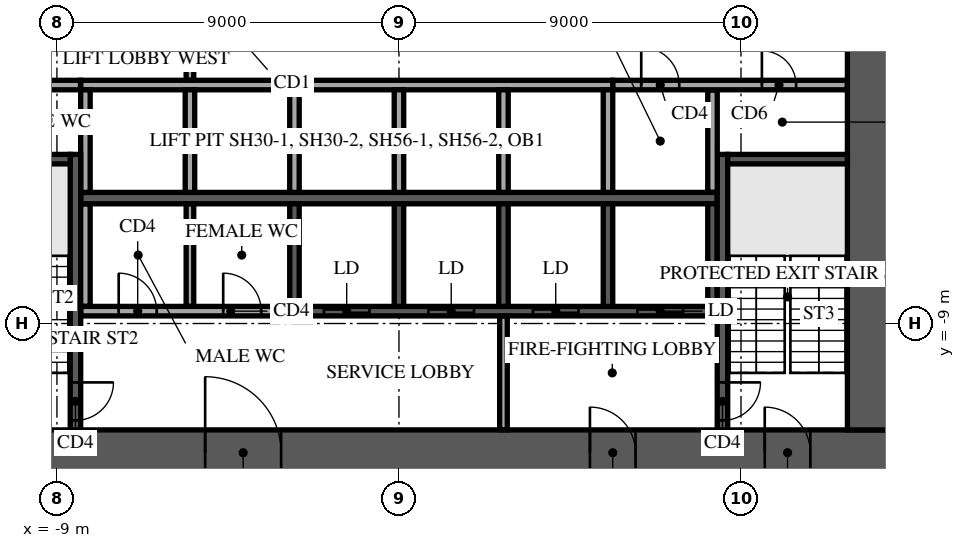
"""IFC4 building model, lengths in metres.
Left out: names, types, materials, properties, quantities, classifications, styles, units other than length and angle.
Written with IfcOpenShell. Run it as: python <this file> out.ifc"""

import sys

from ifc_helpers import new_model, si_unit, direction, frame, frame_2d, origin, place, context, subcontext, project, spatial, rectangle, extrude, element, fill, save


model = new_model("IFC4")
c1 = context("Model", 3, precision=1e-05, world=origin(), true_north=direction((0.0, 1.0)))
c2 = subcontext(c1, "Body", "Model", "MODEL_VIEW")
j1 = project(units=[si_unit("LENGTHUNIT", "METRE"), si_unit("PLANEANGLEUNIT", "RADIAN")], contexts=[c1])
p1 = place(None, origin())
s1 = spatial("IfcSite", under=j1, at=p1, CompositionType="ELEMENT")
p2 = place(p1, origin())
s2 = spatial("IfcBuilding", under=s1, at=p2, CompositionType="ELEMENT")
p3 = place(p2, frame((0.0, 0.0, -4.5)))
s3 = spatial("IfcBuildingStorey", under=s2, at=p3, CompositionType="ELEMENT", Elevation=-4.5)
p4 = place(p3, frame((-13.0, -12.4, 0.0), z_axis=(0.0, 0.0, 1.0), x_axis=(1.0, 0.0, 0.0)))
e1 = element("IfcWall", 1, at=p4, inside=s3, PredefinedType="SHEAR", context=c2, shape_type="SweptSolid", body=[
    extrude(rectangle(XDim=26.0, YDim=1.2, at=frame_2d((13.0, 0.0))), origin(), (0.0, 0.0, 1.0), 4.1),
])
p5 = place(p4, frame((7.9, 0.0, 0.0)))
e2 = element("IfcOpeningElement", 2, at=p5, cuts=e1, PredefinedType="OPENING", context=c2, shape_type="SweptSolid", body=[
    extrude(rectangle(XDim=2.0, YDim=2.1, at=frame_2d((1.0, 1.05))), frame((0.0, 0.61, 0.0), z_axis=(0.0, -1.0, 0.0), x_axis=(1.0, 0.0, 0.0)), (0.0, 0.0, 1.0), 1.22),
])
p6 = place(p4, frame((18.025, 0.0, 0.0)))
e3 = element("IfcOpeningElement", 3, at=p6, cuts=e1, PredefinedType="OPENING", context=c2, shape_type="SweptSolid", body=[
    extrude(rectangle(XDim=1.2, YDim=2.1, at=frame_2d((0.6, 1.05))), frame((0.0, 0.61, 0.0), z_axis=(0.0, -1.0, 0.0), x_axis=(1.0, 0.0, 0.0)), (0.0, 0.0, 1.0), 1.22),
])
p7 = place(p4, frame((2.175, 0.0, 0.0)))
e4 = element("IfcOpeningElement", 4, at=p7, cuts=e1, PredefinedType="OPENING", context=c2, shape_type="SweptSolid", body=[
    extrude(rectangle(XDim=1.2, YDim=2.1, at=frame_2d((0.6, 1.05))), frame((0.0, 0.61, 0.0), z_axis=(0.0, -1.0, 0.0), x_axis=(1.0, 0.0, 0.0)), (0.0, 0.0, 1.0), 1.22),
])
p8 = place(p4, frame((22.625, 0.0, 0.0)))
e5 = element("IfcOpeningElement", 5, at=p8, cuts=e1, PredefinedType="OPENING", context=c2, shape_type="SweptSolid", body=[
    extrude(rectangle(XDim=1.2, YDim=2.1, at=frame_2d((0.6, 1.05))), frame((0.0, 0.61, 0.0), z_axis=(0.0, -1.0, 0.0), x_axis=(1.0, 0.0, 0.0)), (0.0, 0.0, 1.0), 1.22),
])
p9 = place(p3, frame((12.4, -11.8, 0.0), z_axis=(0.0, 0.0, 1.0), x_axis=(0.0, 1.0, 0.0)))
e6 = element("IfcWall", 6, at=p9, inside=s3, PredefinedType="SHEAR", context=c2, shape_type="SweptSolid", body=[
    extrude(rectangle(XDim=23.6, YDim=1.2, at=frame_2d((11.8, 0.0))), origin(), (0.0, 0.0, 1.0), 4.1),
])
p10 = place(p9, frame((10.6, 0.0, 0.0)))
e7 = element("IfcOpeningElement", 7, at=p10, cuts=e6, PredefinedType="OPENING", context=c2, shape_type="SweptSolid", body=[
    extrude(rectangle(XDim=2.4, YDim=2.4, at=frame_2d((1.2, 1.2))), frame((0.0, 0.61, 0.0), z_axis=(0.0, -1.0, 0.0), x_axis=(1.0, 0.0, 0.0)), (0.0, 0.0, 1.0), 1.22),
])
p11 = place(p3, frame((-8.375, -5.7, 0.0), z_axis=(0.0, 0.0, 1.0), x_axis=(1.0, 0.0, 0.0)))
e8 = element("IfcWall", 8, at=p11, inside=s3, PredefinedType="SOLIDWALL", context=c2, shape_type="SweptSolid", body=[
    extrude(rectangle(XDim=16.75, YDim=0.3, at=frame_2d((8.375, 0.0))), origin(), (0.0, 0.0, 1.0), 4.1),
])
p12 = place(p3, frame((-8.375, -2.725, 0.0), z_axis=(0.0, 0.0, 1.0), x_axis=(1.0, 0.0, 0.0)))
e9 = element("IfcWall", 9, at=p12, inside=s3, PredefinedType="SOLIDWALL", context=c2, shape_type="SweptSolid", body=[
    extrude(rectangle(XDim=14.0, YDim=0.25, at=frame_2d((7.0, 0.0))), origin(), (0.0, 0.0, 1.0), 4.1),
])
for number, where, z_axis, x_axis in (
    (10, (-8.25, -5.55, 0.0), (0.0, 0.0, 1.0), (0.0, 1.0, 0.0)),
    (11, (-5.5, -5.55, 0.0), (0.0, 0.0, 1.0), (0.0, 1.0, 0.0)),
    (12, (-2.75, -5.55, 0.0), (0.0, 0.0, 1.0), (0.0, 1.0, 0.0)),
    (13, (0.0, -5.55, 0.0), (0.0, 0.0, 1.0), (0.0, 1.0, 0.0)),
    (14, (2.75, -5.55, 0.0), (0.0, 0.0, 1.0), (0.0, 1.0, 0.0)),
    (15, (5.5, -5.55, 0.0), (0.0, 0.0, 1.0), (0.0, 1.0, 0.0)),
):
    element("IfcWall", number, at=place(p3, frame(where, z_axis=z_axis, x_axis=x_axis)), inside=s3, PredefinedType="SOLIDWALL", context=c2, shape_type="SweptSolid", body=[
        extrude(rectangle(XDim=2.7, YDim=0.25, at=frame_2d((1.35, 0.0))), origin(), (0.0, 0.0, 1.0), 4.1),
    ])
p13 = place(p3, frame((-2.875, -8.675, 0.0), z_axis=(0.0, 0.0, 1.0), x_axis=(1.0, 0.0, 0.0)))
e16 = element("IfcWall", 16, at=p13, inside=s3, PredefinedType="SOLIDWALL", context=c2, shape_type="SweptSolid", body=[
    extrude(rectangle(XDim=11.25, YDim=0.25, at=frame_2d((5.625, 0.0))), origin(), (0.0, 0.0, 1.0), 4.1),
])
p14 = place(p13, frame((0.9, 0.0, 0.0)))
e17 = element("IfcOpeningElement", 17, at=p14, cuts=e16, PredefinedType="OPENING", context=c2, shape_type="SweptSolid", body=[
    extrude(rectangle(XDim=1.2, YDim=2.1, at=frame_2d((0.6, 1.05))), frame((0.0, 0.135, 0.0), z_axis=(0.0, -1.0, 0.0), x_axis=(1.0, 0.0, 0.0)), (0.0, 0.0, 1.0), 0.27),
])
p15 = place(p13, frame((3.65, 0.0, 0.0)))
e18 = element("IfcOpeningElement", 18, at=p15, cuts=e16, PredefinedType="OPENING", context=c2, shape_type="SweptSolid", body=[
    extrude(rectangle(XDim=1.2, YDim=2.1, at=frame_2d((0.6, 1.05))), frame((0.0, 0.135, 0.0), z_axis=(0.0, -1.0, 0.0), x_axis=(1.0, 0.0, 0.0)), (0.0, 0.0, 1.0), 0.27),
])
p16 = place(p13, frame((6.4, 0.0, 0.0)))
e19 = element("IfcOpeningElement", 19, at=p16, cuts=e16, PredefinedType="OPENING", context=c2, shape_type="SweptSolid", body=[
    extrude(rectangle(XDim=1.2, YDim=2.1, at=frame_2d((0.6, 1.05))), frame((0.0, 0.135, 0.0), z_axis=(0.0, -1.0, 0.0), x_axis=(1.0, 0.0, 0.0)), (0.0, 0.0, 1.0), 0.27),
])
p17 = place(p13, frame((9.15, 0.0, 0.0)))
e20 = element("IfcOpeningElement", 20, at=p17, cuts=e16, PredefinedType="OPENING", context=c2, shape_type="SweptSolid", body=[
    extrude(rectangle(XDim=1.2, YDim=2.1, at=frame_2d((0.6, 1.05))), frame((0.0, 0.135, 0.0), z_axis=(0.0, -1.0, 0.0), x_axis=(1.0, 0.0, 0.0)), (0.0, 0.0, 1.0), 0.27),
])
for number, where, z_axis, x_axis in (
    (21, (-2.75, -8.55, 0.0), (0.0, 0.0, 1.0), (0.0, 1.0, 0.0)),
    (22, (0.0, -8.55, 0.0), (0.0, 0.0, 1.0), (0.0, 1.0, 0.0)),
    (23, (2.75, -8.55, 0.0), (0.0, 0.0, 1.0), (0.0, 1.0, 0.0)),
    (24, (5.5, -8.55, 0.0), (0.0, 0.0, 1.0), (0.0, 1.0, 0.0)),
    (25, (8.25, -8.55, 0.0), (0.0, 0.0, 1.0), (0.0, 1.0, 0.0)),
):
    element("IfcWall", number, at=place(p3, frame(where, z_axis=z_axis, x_axis=x_axis)), inside=s3, PredefinedType="SOLIDWALL", context=c2, shape_type="SweptSolid", body=[
        extrude(rectangle(XDim=2.7, YDim=0.25, at=frame_2d((1.35, 0.0))), origin(), (0.0, 0.0, 1.0), 4.1),
    ])
p18 = place(p3, frame((-8.512, -4.55, 0.0), z_axis=(0.0, 0.0, 1.0), x_axis=(0.0, -1.0, 0.0)))
e26 = element("IfcWall", 26, at=p18, inside=s3, PredefinedType="SOLIDWALL", context=c2, shape_type="SweptSolid", body=[
    extrude(rectangle(XDim=7.25, YDim=0.275, at=frame_2d((3.625, 0.0))), origin(), (0.0, 0.0, 1.0), 4.1),
])
p19 = place(p18, frame((6.0, 0.0, 0.0)))
e27 = element("IfcOpeningElement", 27, at=p19, cuts=e26, PredefinedType="OPENING", context=c2, shape_type="SweptSolid", body=[
    extrude(rectangle(XDim=1.0, YDim=2.1, at=frame_2d((0.5, 1.05))), frame((0.0, 0.147, 0.0), z_axis=(0.0, -1.0, 0.0), x_axis=(1.0, 0.0, 0.0)), (0.0, 0.0, 1.0), 0.295),
])
p20 = place(p3, frame((-8.65, -4.675, 0.0), z_axis=(0.0, 0.0, 1.0), x_axis=(-1.0, 0.0, 0.0)))
e28 = element("IfcWall", 28, at=p20, inside=s3, PredefinedType="SOLIDWALL", context=c2, shape_type="SweptSolid", body=[
    extrude(rectangle(XDim=3.15, YDim=0.25, at=frame_2d((1.575, 0.0))), origin(), (0.0, 0.0, 1.0), 4.1),
])
p21 = place(p3, frame((8.512, -4.55, 0.0), z_axis=(0.0, 0.0, 1.0), x_axis=(0.0, -1.0, 0.0)))
e29 = element("IfcWall", 29, at=p21, inside=s3, PredefinedType="SOLIDWALL", context=c2, shape_type="SweptSolid", body=[
    extrude(rectangle(XDim=7.25, YDim=0.275, at=frame_2d((3.625, 0.0))), origin(), (0.0, 0.0, 1.0), 4.1),
])
p22 = place(p21, frame((6.0, 0.0, 0.0)))
e30 = element("IfcOpeningElement", 30, at=p22, cuts=e29, PredefinedType="OPENING", context=c2, shape_type="SweptSolid", body=[
    extrude(rectangle(XDim=1.0, YDim=2.1, at=frame_2d((0.5, 1.05))), frame((0.0, 0.147, 0.0), z_axis=(0.0, -1.0, 0.0), x_axis=(1.0, 0.0, 0.0)), (0.0, 0.0, 1.0), 0.295),
])
p23 = place(p3, frame((8.65, -4.675, 0.0), z_axis=(0.0, 0.0, 1.0), x_axis=(1.0, 0.0, 0.0)))
e31 = element("IfcWall", 31, at=p23, inside=s3, PredefinedType="SOLIDWALL", context=c2, shape_type="SweptSolid", body=[
    extrude(rectangle(XDim=3.15, YDim=0.25, at=frame_2d((1.575, 0.0))), origin(), (0.0, 0.0, 1.0), 4.1),
])
p24 = place(p3, frame((2.75, -11.795, 0.0), z_axis=(0.0, 0.0, 1.0), x_axis=(0.0, 1.0, 0.0)))
e32 = element("IfcWall", 32, at=p24, inside=s3, PredefinedType="PARTITIONING", context=c2, shape_type="SweptSolid", body=[
    extrude(rectangle(XDim=2.99, YDim=0.2, at=frame_2d((1.495, 0.0))), origin(), (0.0, 0.0, 1.0), 4.1),
])
p25 = place(p3, frame((-8.37, -8.675, 0.0), z_axis=(0.0, 0.0, 1.0), x_axis=(1.0, 0.0, 0.0)))
e33 = element("IfcWall", 33, at=p25, inside=s3, PredefinedType="PARTITIONING", context=c2, shape_type="SweptSolid", body=[
    extrude(rectangle(XDim=5.49, YDim=0.25, at=frame_2d((2.745, 0.0))), origin(), (0.0, 0.0, 1.0), 4.1),
])
p26 = place(p25, frame((0.995, 0.0, 0.0)))
e34 = element("IfcOpeningElement", 34, at=p26, cuts=e33, PredefinedType="OPENING", context=c2, shape_type="SweptSolid", body=[
    extrude(rectangle(XDim=1.0, YDim=2.1, at=frame_2d((0.5, 1.05))), frame((0.0, 0.135, 0.0), z_axis=(0.0, -1.0, 0.0), x_axis=(1.0, 0.0, 0.0)), (0.0, 0.0, 1.0), 0.27),
])
p27 = place(p25, frame((3.745, 0.0, 0.0)))
e35 = element("IfcOpeningElement", 35, at=p27, cuts=e33, PredefinedType="OPENING", context=c2, shape_type="SweptSolid", body=[
    extrude(rectangle(XDim=1.0, YDim=2.1, at=frame_2d((0.5, 1.05))), frame((0.0, 0.135, 0.0), z_axis=(0.0, -1.0, 0.0), x_axis=(1.0, 0.0, 0.0)), (0.0, 0.0, 1.0), 0.27),
])
p28 = place(p3, frame((-8.25, -8.545, 0.0), z_axis=(0.0, 0.0, 1.0), x_axis=(0.0, 1.0, 0.0)))
e36 = element("IfcWall", 36, at=p28, inside=s3, PredefinedType="PARTITIONING", context=c2, shape_type="SweptSolid", body=[
    extrude(rectangle(XDim=2.69, YDim=0.25, at=frame_2d((1.345, 0.0))), origin(), (0.0, 0.0, 1.0), 4.1),
])
p29 = place(p3, frame((-5.5, -8.545, 0.0), z_axis=(0.0, 0.0, 1.0), x_axis=(0.0, 1.0, 0.0)))
e37 = element("IfcWall", 37, at=p29, inside=s3, PredefinedType="PARTITIONING", context=c2, shape_type="SweptSolid", body=[
    extrude(rectangle(XDim=2.69, YDim=0.2, at=frame_2d((1.345, 0.0))), origin(), (0.0, 0.0, 1.0), 4.1),
])
p30 = place(p3, frame((8.25, -5.545, 0.0), z_axis=(0.0, 0.0, 1.0), x_axis=(0.0, 1.0, 0.0)))
e38 = element("IfcWall", 38, at=p30, inside=s3, PredefinedType="PARTITIONING", context=c2, shape_type="SweptSolid", body=[
    extrude(rectangle(XDim=2.69, YDim=0.25, at=frame_2d((1.345, 0.0))), origin(), (0.0, 0.0, 1.0), 4.1),
])
p31 = place(p3, frame((-11.795, -2.725, 0.0), z_axis=(0.0, 0.0, 1.0), x_axis=(1.0, 0.0, 0.0)))
e39 = element("IfcWall", 39, at=p31, inside=s3, PredefinedType="PARTITIONING", context=c2, shape_type="SweptSolid", body=[
    extrude(rectangle(XDim=3.415, YDim=0.25, at=frame_2d((1.708, 0.0))), origin(), (0.0, 0.0, 1.0), 4.1),
])
p32 = place(p31, frame((1.295, 0.0, 0.0)))
e40 = element("IfcOpeningElement", 40, at=p32, cuts=e39, PredefinedType="OPENING", context=c2, shape_type="SweptSolid", body=[
    extrude(rectangle(XDim=1.0, YDim=2.1, at=frame_2d((0.5, 1.05))), frame((0.0, 0.135, 0.0), z_axis=(0.0, -1.0, 0.0), x_axis=(1.0, 0.0, 0.0)), (0.0, 0.0, 1.0), 0.27),
])
p33 = place(p3, frame((5.63, -2.725, 0.0), z_axis=(0.0, 0.0, 1.0), x_axis=(1.0, 0.0, 0.0)))
e41 = element("IfcWall", 41, at=p33, inside=s3, PredefinedType="PARTITIONING", context=c2, shape_type="SweptSolid", body=[
    extrude(rectangle(XDim=6.165, YDim=0.25, at=frame_2d((3.083, 0.0))), origin(), (0.0, 0.0, 1.0), 4.1),
])
p34 = place(p33, frame((0.745, 0.0, 0.0)))
e42 = element("IfcOpeningElement", 42, at=p34, cuts=e41, PredefinedType="OPENING", context=c2, shape_type="SweptSolid", body=[
    extrude(rectangle(XDim=1.0, YDim=2.1, at=frame_2d((0.5, 1.05))), frame((0.0, 0.135, 0.0), z_axis=(0.0, -1.0, 0.0), x_axis=(1.0, 0.0, 0.0)), (0.0, 0.0, 1.0), 0.27),
])
p35 = place(p33, frame((3.92, 0.0, 0.0)))
e43 = element("IfcOpeningElement", 43, at=p35, cuts=e41, PredefinedType="OPENING", context=c2, shape_type="SweptSolid", body=[
    extrude(rectangle(XDim=0.9, YDim=2.1, at=frame_2d((0.45, 1.05))), frame((0.0, 0.135, 0.0), z_axis=(0.0, -1.0, 0.0), x_axis=(1.0, 0.0, 0.0)), (0.0, 0.0, 1.0), 0.27),
])
p36 = place(p3, frame((-5.5, -2.595, 0.0), z_axis=(0.0, 0.0, 1.0), x_axis=(0.0, 1.0, 0.0)))
e44 = element("IfcWall", 44, at=p36, inside=s3, PredefinedType="PARTITIONING", context=c2, shape_type="SweptSolid", body=[
    extrude(rectangle(XDim=5.19, YDim=0.2, at=frame_2d((2.595, 0.0))), origin(), (0.0, 0.0, 1.0), 4.1),
])
p37 = place(p36, frame((1.395, 0.0, 0.0)))
e45 = element("IfcOpeningElement", 45, at=p37, cuts=e44, PredefinedType="OPENING", context=c2, shape_type="SweptSolid", body=[
    extrude(rectangle(XDim=2.4, YDim=2.4, at=frame_2d((1.2, 1.2))), frame((0.0, 0.11, 0.0), z_axis=(0.0, -1.0, 0.0), x_axis=(1.0, 0.0, 0.0)), (0.0, 0.0, 1.0), 0.22),
])
p38 = place(p5, origin())
e46 = element("IfcDoor", 46, at=p38, inside=s3, OperationType="SINGLE_SWING_LEFT", PredefinedType="DOOR", context=c2, shape_type="SweptSolid", body=[
    extrude(rectangle(XDim=2.0, YDim=2.1, at=frame_2d((1.0, 1.05))), frame((0.0, 0.025, 0.0), z_axis=(0.0, -1.0, 0.0), x_axis=(1.0, 0.0, 0.0)), (0.0, 0.0, 1.0), 0.05),
])
fill(e2, e46)
p39 = place(p6, origin())
e47 = element("IfcDoor", 47, at=p39, inside=s3, OperationType="SINGLE_SWING_LEFT", PredefinedType="DOOR", context=c2, shape_type="SweptSolid", body=[
    extrude(rectangle(XDim=1.2, YDim=2.1, at=frame_2d((0.6, 1.05))), frame((0.0, 0.025, 0.0), z_axis=(0.0, -1.0, 0.0), x_axis=(1.0, 0.0, 0.0)), (0.0, 0.0, 1.0), 0.05),
])
fill(e3, e47)
p40 = place(p8, origin())
e48 = element("IfcDoor", 48, at=p40, inside=s3, OperationType="SINGLE_SWING_LEFT", PredefinedType="DOOR", context=c2, shape_type="SweptSolid", body=[
    extrude(rectangle(XDim=1.2, YDim=2.1, at=frame_2d((0.6, 1.05))), frame((0.0, 0.025, 0.0), z_axis=(0.0, -1.0, 0.0), x_axis=(1.0, 0.0, 0.0)), (0.0, 0.0, 1.0), 0.05),
])
fill(e5, e48)
p41 = place(p14, origin())
e49 = element("IfcDoor", 49, at=p41, inside=s3, OperationType="DOUBLE_DOOR_SLIDING", PredefinedType="DOOR", context=c2, shape_type="SweptSolid", body=[
    extrude(rectangle(XDim=1.2, YDim=2.1, at=frame_2d((0.6, 1.05))), frame((0.0, 0.025, 0.0), z_axis=(0.0, -1.0, 0.0), x_axis=(1.0, 0.0, 0.0)), (0.0, 0.0, 1.0), 0.05),
])
fill(e17, e49)
p42 = place(p15, origin())
e50 = element("IfcDoor", 50, at=p42, inside=s3, OperationType="DOUBLE_DOOR_SLIDING", PredefinedType="DOOR", context=c2, shape_type="SweptSolid", body=[
    extrude(rectangle(XDim=1.2, YDim=2.1, at=frame_2d((0.6, 1.05))), frame((0.0, 0.025, 0.0), z_axis=(0.0, -1.0, 0.0), x_axis=(1.0, 0.0, 0.0)), (0.0, 0.0, 1.0), 0.05),
])
fill(e18, e50)
p43 = place(p16, origin())
e51 = element("IfcDoor", 51, at=p43, inside=s3, OperationType="DOUBLE_DOOR_SLIDING", PredefinedType="DOOR", context=c2, shape_type="SweptSolid", body=[
    extrude(rectangle(XDim=1.2, YDim=2.1, at=frame_2d((0.6, 1.05))), frame((0.0, 0.025, 0.0), z_axis=(0.0, -1.0, 0.0), x_axis=(1.0, 0.0, 0.0)), (0.0, 0.0, 1.0), 0.05),
])
fill(e19, e51)
p44 = place(p17, origin())
e52 = element("IfcDoor", 52, at=p44, inside=s3, OperationType="DOUBLE_DOOR_SLIDING", PredefinedType="DOOR", context=c2, shape_type="SweptSolid", body=[
    extrude(rectangle(XDim=1.2, YDim=2.1, at=frame_2d((0.6, 1.05))), frame((0.0, 0.025, 0.0), z_axis=(0.0, -1.0, 0.0), x_axis=(1.0, 0.0, 0.0)), (0.0, 0.0, 1.0), 0.05),
])
fill(e20, e52)
p45 = place(p19, origin())
e53 = element("IfcDoor", 53, at=p45, inside=s3, OperationType="SINGLE_SWING_LEFT", PredefinedType="DOOR", context=c2, shape_type="SweptSolid", body=[
    extrude(rectangle(XDim=1.0, YDim=2.1, at=frame_2d((0.5, 1.05))), frame((0.0, 0.025, 0.0), z_axis=(0.0, -1.0, 0.0), x_axis=(1.0, 0.0, 0.0)), (0.0, 0.0, 1.0), 0.05),
])
fill(e27, e53)
p46 = place(p22, origin())
e54 = element("IfcDoor", 54, at=p46, inside=s3, OperationType="SINGLE_SWING_LEFT", PredefinedType="DOOR", context=c2, shape_type="SweptSolid", body=[
    extrude(rectangle(XDim=1.0, YDim=2.1, at=frame_2d((0.5, 1.05))), frame((0.0, 0.025, 0.0), z_axis=(0.0, -1.0, 0.0), x_axis=(1.0, 0.0, 0.0)), (0.0, 0.0, 1.0), 0.05),
])
fill(e30, e54)
p47 = place(p26, origin())
e55 = element("IfcDoor", 55, at=p47, inside=s3, OperationType="SINGLE_SWING_RIGHT", PredefinedType="DOOR", context=c2, shape_type="SweptSolid", body=[
    extrude(rectangle(XDim=1.0, YDim=2.1, at=frame_2d((0.5, 1.05))), frame((0.0, 0.025, 0.0), z_axis=(0.0, -1.0, 0.0), x_axis=(1.0, 0.0, 0.0)), (0.0, 0.0, 1.0), 0.05),
])
fill(e34, e55)
p48 = place(p27, origin())
e56 = element("IfcDoor", 56, at=p48, inside=s3, OperationType="SINGLE_SWING_RIGHT", PredefinedType="DOOR", context=c2, shape_type="SweptSolid", body=[
    extrude(rectangle(XDim=1.0, YDim=2.1, at=frame_2d((0.5, 1.05))), frame((0.0, 0.025, 0.0), z_axis=(0.0, -1.0, 0.0), x_axis=(1.0, 0.0, 0.0)), (0.0, 0.0, 1.0), 0.05),
])
fill(e35, e56)
p49 = place(p34, origin())
e57 = element("IfcDoor", 57, at=p49, inside=s3, OperationType="SINGLE_SWING_RIGHT", PredefinedType="DOOR", context=c2, shape_type="SweptSolid", body=[
    extrude(rectangle(XDim=1.0, YDim=2.1, at=frame_2d((0.5, 1.05))), frame((0.0, 0.025, 0.0), z_axis=(0.0, -1.0, 0.0), x_axis=(1.0, 0.0, 0.0)), (0.0, 0.0, 1.0), 0.05),
])
fill(e42, e57)
p50 = place(p35, origin())
e58 = element("IfcDoor", 58, at=p50, inside=s3, OperationType="SINGLE_SWING_RIGHT", PredefinedType="DOOR", context=c2, shape_type="SweptSolid", body=[
    extrude(rectangle(XDim=0.9, YDim=2.1, at=frame_2d((0.45, 1.05))), frame((0.0, 0.025, 0.0), z_axis=(0.0, -1.0, 0.0), x_axis=(1.0, 0.0, 0.0)), (0.0, 0.0, 1.0), 0.05),
])
fill(e43, e58)
save(model, sys.argv[1])
